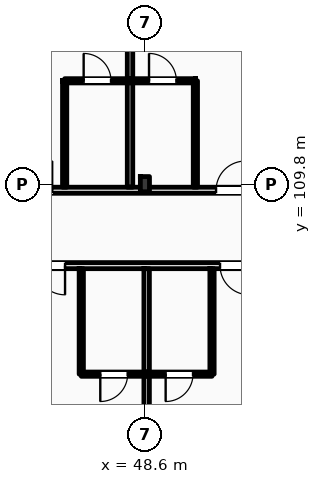
"""IFC4 building model, lengths in metres.
Left out: names, types, materials, properties, quantities, classifications, styles, units other than length and angle.
Written with IfcOpenShell. Run it as: python <this file> out.ifc"""

import sys

from ifc_helpers import new_model, si_unit, direction, frame, frame_2d, origin, origin_2d, place, context, subcontext, project, spatial, rectangle, i_section, extrude, element, fill, save


model = new_model("IFC4")
c1 = context("Model", 3, precision=1e-05, world=origin(), true_north=direction((0.0, 1.0)))
c2 = subcontext(c1, "Body", "Model", "MODEL_VIEW")
j1 = project(units=[si_unit("LENGTHUNIT", "METRE"), si_unit("PLANEANGLEUNIT", "RADIAN")], contexts=[c1])
p1 = place(None, origin())
s1 = spatial("IfcSite", under=j1, at=p1, CompositionType="ELEMENT")
p2 = place(p1, origin())
s2 = spatial("IfcBuilding", under=s1, at=p2, CompositionType="ELEMENT")
p3 = place(p2, frame((0.0, 0.0, 24.6)))
s3 = spatial("IfcBuildingStorey", under=s2, at=p3, CompositionType="ELEMENT", Elevation=24.6)
p4 = place(p3, frame((48.6, 109.8, 0.0), z_axis=(0.0, 0.0, 1.0), x_axis=(1.0, 0.0, 0.0)))
e1 = element("IfcColumn", 1, at=p4, inside=s3, PredefinedType="COLUMN", context=c2, shape_type="SweptSolid", body=[
    extrude(i_section(OverallWidth=0.3, OverallDepth=0.5, WebThickness=0.014, FlangeThickness=0.028, FilletRadius=0.027, at=origin_2d()), origin(), (0.0, 0.0, 1.0), 3.6),
])
p5 = place(p3, frame((10.65, 109.6, 0.0), z_axis=(0.0, 0.0, 1.0), x_axis=(1.0, 0.0, 0.0)))
e2 = element("IfcWall", 2, at=p5, inside=s3, PredefinedType="PARTITIONING", context=c2, shape_type="SweptSolid", body=[
    extrude(rectangle(XDim=109.21, YDim=0.2, at=frame_2d((54.605, 0.0))), origin(), (0.0, 0.0, 1.0), 2.78),
])
p6 = place(p5, frame((12.705, 0.0, 0.0)))
e3 = element("IfcOpeningElement", 3, at=p6, cuts=e2, PredefinedType="OPENING", context=c2, shape_type="SweptSolid", body=[
    extrude(rectangle(XDim=1.02, YDim=2.2, at=frame_2d((0.51, 1.1))), frame((0.0, 0.11, 0.0), z_axis=(0.0, -1.0, 0.0), x_axis=(1.0, 0.0, 0.0)), (0.0, 0.0, 1.0), 0.22),
])
p7 = place(p5, frame((19.26, 0.0, 0.0)))
e4 = element("IfcOpeningElement", 4, at=p7, cuts=e2, PredefinedType="OPENING", context=c2, shape_type="SweptSolid", body=[
    extrude(rectangle(XDim=1.02, YDim=2.2, at=frame_2d((0.51, 1.1))), frame((0.0, 0.11, 0.0), z_axis=(0.0, -1.0, 0.0), x_axis=(1.0, 0.0, 0.0)), (0.0, 0.0, 1.0), 0.22),
])
p8 = place(p5, frame((23.71, 0.0, 0.0)))
e5 = element("IfcOpeningElement", 5, at=p8, cuts=e2, PredefinedType="OPENING", context=c2, shape_type="SweptSolid", body=[
    extrude(rectangle(XDim=1.02, YDim=2.2, at=frame_2d((0.51, 1.1))), frame((0.0, 0.11, 0.0), z_axis=(0.0, -1.0, 0.0), x_axis=(1.0, 0.0, 0.0)), (0.0, 0.0, 1.0), 0.22),
])
p9 = place(p5, frame((27.66, 0.0, 0.0)))
e6 = element("IfcOpeningElement", 6, at=p9, cuts=e2, PredefinedType="OPENING", context=c2, shape_type="SweptSolid", body=[
    extrude(rectangle(XDim=1.02, YDim=2.2, at=frame_2d((0.51, 1.1))), frame((0.0, 0.11, 0.0), z_axis=(0.0, -1.0, 0.0), x_axis=(1.0, 0.0, 0.0)), (0.0, 0.0, 1.0), 0.22),
])
p10 = place(p5, frame((31.89, 0.0, 0.0)))
e7 = element("IfcOpeningElement", 7, at=p10, cuts=e2, PredefinedType="OPENING", context=c2, shape_type="SweptSolid", body=[
    extrude(rectangle(XDim=0.96, YDim=2.2, at=frame_2d((0.48, 1.1))), frame((0.0, 0.11, 0.0), z_axis=(0.0, -1.0, 0.0), x_axis=(1.0, 0.0, 0.0)), (0.0, 0.0, 1.0), 0.22),
])
p11 = place(p5, frame((33.94, 0.0, 0.0)))
e8 = element("IfcOpeningElement", 8, at=p11, cuts=e2, PredefinedType="OPENING", context=c2, shape_type="SweptSolid", body=[
    extrude(rectangle(XDim=0.96, YDim=2.2, at=frame_2d((0.48, 1.1))), frame((0.0, 0.11, 0.0), z_axis=(0.0, -1.0, 0.0), x_axis=(1.0, 0.0, 0.0)), (0.0, 0.0, 1.0), 0.22),
])
p12 = place(p5, frame((40.29, 0.0, 0.0)))
e9 = element("IfcOpeningElement", 9, at=p12, cuts=e2, PredefinedType="OPENING", context=c2, shape_type="SweptSolid", body=[
    extrude(rectangle(XDim=0.96, YDim=2.2, at=frame_2d((0.48, 1.1))), frame((0.0, 0.11, 0.0), z_axis=(0.0, -1.0, 0.0), x_axis=(1.0, 0.0, 0.0)), (0.0, 0.0, 1.0), 0.22),
])
p13 = place(p5, frame((42.34, 0.0, 0.0)))
e10 = element("IfcOpeningElement", 10, at=p13, cuts=e2, PredefinedType="OPENING", context=c2, shape_type="SweptSolid", body=[
    extrude(rectangle(XDim=0.96, YDim=2.2, at=frame_2d((0.48, 1.1))), frame((0.0, 0.11, 0.0), z_axis=(0.0, -1.0, 0.0), x_axis=(1.0, 0.0, 0.0)), (0.0, 0.0, 1.0), 0.22),
])
p14 = place(p5, frame((48.69, 0.0, 0.0)))
e11 = element("IfcOpeningElement", 11, at=p14, cuts=e2, PredefinedType="OPENING", context=c2, shape_type="SweptSolid", body=[
    extrude(rectangle(XDim=0.96, YDim=2.2, at=frame_2d((0.48, 1.1))), frame((0.0, 0.11, 0.0), z_axis=(0.0, -1.0, 0.0), x_axis=(1.0, 0.0, 0.0)), (0.0, 0.0, 1.0), 0.22),
])
p15 = place(p5, frame((50.74, 0.0, 0.0)))
e12 = element("IfcOpeningElement", 12, at=p15, cuts=e2, PredefinedType="OPENING", context=c2, shape_type="SweptSolid", body=[
    extrude(rectangle(XDim=0.96, YDim=2.2, at=frame_2d((0.48, 1.1))), frame((0.0, 0.11, 0.0), z_axis=(0.0, -1.0, 0.0), x_axis=(1.0, 0.0, 0.0)), (0.0, 0.0, 1.0), 0.22),
])
p16 = place(p5, frame((57.09, 0.0, 0.0)))
e13 = element("IfcOpeningElement", 13, at=p16, cuts=e2, PredefinedType="OPENING", context=c2, shape_type="SweptSolid", body=[
    extrude(rectangle(XDim=0.96, YDim=2.2, at=frame_2d((0.48, 1.1))), frame((0.0, 0.11, 0.0), z_axis=(0.0, -1.0, 0.0), x_axis=(1.0, 0.0, 0.0)), (0.0, 0.0, 1.0), 0.22),
])
p17 = place(p5, frame((59.14, 0.0, 0.0)))
e14 = element("IfcOpeningElement", 14, at=p17, cuts=e2, PredefinedType="OPENING", context=c2, shape_type="SweptSolid", body=[
    extrude(rectangle(XDim=0.96, YDim=2.2, at=frame_2d((0.48, 1.1))), frame((0.0, 0.11, 0.0), z_axis=(0.0, -1.0, 0.0), x_axis=(1.0, 0.0, 0.0)), (0.0, 0.0, 1.0), 0.22),
])
p18 = place(p5, frame((65.49, 0.0, 0.0)))
e15 = element("IfcOpeningElement", 15, at=p18, cuts=e2, PredefinedType="OPENING", context=c2, shape_type="SweptSolid", body=[
    extrude(rectangle(XDim=0.96, YDim=2.2, at=frame_2d((0.48, 1.1))), frame((0.0, 0.11, 0.0), z_axis=(0.0, -1.0, 0.0), x_axis=(1.0, 0.0, 0.0)), (0.0, 0.0, 1.0), 0.22),
])
p19 = place(p5, frame((67.54, 0.0, 0.0)))
e16 = element("IfcOpeningElement", 16, at=p19, cuts=e2, PredefinedType="OPENING", context=c2, shape_type="SweptSolid", body=[
    extrude(rectangle(XDim=0.96, YDim=2.2, at=frame_2d((0.48, 1.1))), frame((0.0, 0.11, 0.0), z_axis=(0.0, -1.0, 0.0), x_axis=(1.0, 0.0, 0.0)), (0.0, 0.0, 1.0), 0.22),
])
p20 = place(p5, frame((73.89, 0.0, 0.0)))
e17 = element("IfcOpeningElement", 17, at=p20, cuts=e2, PredefinedType="OPENING", context=c2, shape_type="SweptSolid", body=[
    extrude(rectangle(XDim=0.96, YDim=2.2, at=frame_2d((0.48, 1.1))), frame((0.0, 0.11, 0.0), z_axis=(0.0, -1.0, 0.0), x_axis=(1.0, 0.0, 0.0)), (0.0, 0.0, 1.0), 0.22),
])
p21 = place(p5, frame((78.09, 0.0, 0.0)))
e18 = element("IfcOpeningElement", 18, at=p21, cuts=e2, PredefinedType="OPENING", context=c2, shape_type="SweptSolid", body=[
    extrude(rectangle(XDim=0.96, YDim=2.2, at=frame_2d((0.48, 1.1))), frame((0.0, 0.11, 0.0), z_axis=(0.0, -1.0, 0.0), x_axis=(1.0, 0.0, 0.0)), (0.0, 0.0, 1.0), 0.22),
])
p22 = place(p5, frame((82.29, 0.0, 0.0)))
e19 = element("IfcOpeningElement", 19, at=p22, cuts=e2, PredefinedType="OPENING", context=c2, shape_type="SweptSolid", body=[
    extrude(rectangle(XDim=0.96, YDim=2.2, at=frame_2d((0.48, 1.1))), frame((0.0, 0.11, 0.0), z_axis=(0.0, -1.0, 0.0), x_axis=(1.0, 0.0, 0.0)), (0.0, 0.0, 1.0), 0.22),
])
p23 = place(p5, frame((86.49, 0.0, 0.0)))
e20 = element("IfcOpeningElement", 20, at=p23, cuts=e2, PredefinedType="OPENING", context=c2, shape_type="SweptSolid", body=[
    extrude(rectangle(XDim=0.96, YDim=2.2, at=frame_2d((0.48, 1.1))), frame((0.0, 0.11, 0.0), z_axis=(0.0, -1.0, 0.0), x_axis=(1.0, 0.0, 0.0)), (0.0, 0.0, 1.0), 0.22),
])
p24 = place(p5, frame((88.54, 0.0, 0.0)))
e21 = element("IfcOpeningElement", 21, at=p24, cuts=e2, PredefinedType="OPENING", context=c2, shape_type="SweptSolid", body=[
    extrude(rectangle(XDim=0.96, YDim=2.2, at=frame_2d((0.48, 1.1))), frame((0.0, 0.11, 0.0), z_axis=(0.0, -1.0, 0.0), x_axis=(1.0, 0.0, 0.0)), (0.0, 0.0, 1.0), 0.22),
])
p25 = place(p5, frame((94.89, 0.0, 0.0)))
e22 = element("IfcOpeningElement", 22, at=p25, cuts=e2, PredefinedType="OPENING", context=c2, shape_type="SweptSolid", body=[
    extrude(rectangle(XDim=0.96, YDim=2.2, at=frame_2d((0.48, 1.1))), frame((0.0, 0.11, 0.0), z_axis=(0.0, -1.0, 0.0), x_axis=(1.0, 0.0, 0.0)), (0.0, 0.0, 1.0), 0.22),
])
p26 = place(p5, frame((96.94, 0.0, 0.0)))
e23 = element("IfcOpeningElement", 23, at=p26, cuts=e2, PredefinedType="OPENING", context=c2, shape_type="SweptSolid", body=[
    extrude(rectangle(XDim=0.96, YDim=2.2, at=frame_2d((0.48, 1.1))), frame((0.0, 0.11, 0.0), z_axis=(0.0, -1.0, 0.0), x_axis=(1.0, 0.0, 0.0)), (0.0, 0.0, 1.0), 0.22),
])
p27 = place(p5, frame((103.29, 0.0, 0.0)))
e24 = element("IfcOpeningElement", 24, at=p27, cuts=e2, PredefinedType="OPENING", context=c2, shape_type="SweptSolid", body=[
    extrude(rectangle(XDim=0.96, YDim=2.2, at=frame_2d((0.48, 1.1))), frame((0.0, 0.11, 0.0), z_axis=(0.0, -1.0, 0.0), x_axis=(1.0, 0.0, 0.0)), (0.0, 0.0, 1.0), 0.22),
])
p28 = place(p5, frame((105.25, 0.0, 0.0)))
e25 = element("IfcOpeningElement", 25, at=p28, cuts=e2, PredefinedType="OPENING", context=c2, shape_type="SweptSolid", body=[
    extrude(rectangle(XDim=0.96, YDim=2.2, at=frame_2d((0.48, 1.1))), frame((0.0, 0.11, 0.0), z_axis=(0.0, -1.0, 0.0), x_axis=(1.0, 0.0, 0.0)), (0.0, 0.0, 1.0), 0.22),
])
p29 = place(p5, frame((2.716, 0.0, 0.0)))
e26 = element("IfcOpeningElement", 26, at=p29, cuts=e2, PredefinedType="OPENING", context=c2, shape_type="SweptSolid", body=[
    extrude(rectangle(XDim=1.35, YDim=2.25, at=frame_2d((0.675, 1.125))), frame((0.0, 0.11, 0.0), z_axis=(0.0, -1.0, 0.0), x_axis=(1.0, 0.0, 0.0)), (0.0, 0.0, 1.0), 0.22),
])
p30 = place(p5, frame((6.65, 0.0, 0.0)))
e27 = element("IfcOpeningElement", 27, at=p30, cuts=e2, PredefinedType="OPENING", context=c2, shape_type="SweptSolid", body=[
    extrude(rectangle(XDim=1.35, YDim=2.25, at=frame_2d((0.675, 1.125))), frame((0.0, 0.11, 0.0), z_axis=(0.0, -1.0, 0.0), x_axis=(1.0, 0.0, 0.0)), (0.0, 0.0, 1.0), 0.22),
])
p31 = place(p5, frame((10.583, 0.0, 0.0)))
e28 = element("IfcOpeningElement", 28, at=p31, cuts=e2, PredefinedType="OPENING", context=c2, shape_type="SweptSolid", body=[
    extrude(rectangle(XDim=1.35, YDim=2.25, at=frame_2d((0.675, 1.125))), frame((0.0, 0.11, 0.0), z_axis=(0.0, -1.0, 0.0), x_axis=(1.0, 0.0, 0.0)), (0.0, 0.0, 1.0), 0.22),
])
p32 = place(p3, frame((40.76, 107.12, 0.0), z_axis=(0.0, 0.0, 1.0), x_axis=(1.0, 0.0, 0.0)))
e29 = element("IfcWall", 29, at=p32, inside=s3, PredefinedType="PARTITIONING", context=c2, shape_type="SweptSolid", body=[
    extrude(rectangle(XDim=23.44, YDim=0.2, at=frame_2d((11.72, 0.0))), origin(), (0.0, 0.0, 1.0), 3.34),
])
p33 = place(p32, frame((2.449, 0.0, 0.0)))
e30 = element("IfcOpeningElement", 30, at=p33, cuts=e29, PredefinedType="OPENING", context=c2, shape_type="SweptSolid", body=[
    extrude(rectangle(XDim=0.96, YDim=2.2, at=frame_2d((0.48, 1.1))), frame((0.0, 0.11, 0.0), z_axis=(0.0, -1.0, 0.0), x_axis=(1.0, 0.0, 0.0)), (0.0, 0.0, 1.0), 0.22),
])
p34 = place(p32, frame((4.253, 0.0, 0.0)))
e31 = element("IfcOpeningElement", 31, at=p34, cuts=e29, PredefinedType="OPENING", context=c2, shape_type="SweptSolid", body=[
    extrude(rectangle(XDim=0.96, YDim=2.2, at=frame_2d((0.48, 1.1))), frame((0.0, 0.11, 0.0), z_axis=(0.0, -1.0, 0.0), x_axis=(1.0, 0.0, 0.0)), (0.0, 0.0, 1.0), 0.22),
])
p35 = place(p32, frame((10.311, 0.0, 0.0)))
e32 = element("IfcOpeningElement", 32, at=p35, cuts=e29, PredefinedType="OPENING", context=c2, shape_type="SweptSolid", body=[
    extrude(rectangle(XDim=0.96, YDim=2.2, at=frame_2d((0.48, 1.1))), frame((0.0, 0.11, 0.0), z_axis=(0.0, -1.0, 0.0), x_axis=(1.0, 0.0, 0.0)), (0.0, 0.0, 1.0), 0.22),
])
p36 = place(p32, frame((12.069, 0.0, 0.0)))
e33 = element("IfcOpeningElement", 33, at=p36, cuts=e29, PredefinedType="OPENING", context=c2, shape_type="SweptSolid", body=[
    extrude(rectangle(XDim=0.96, YDim=2.2, at=frame_2d((0.48, 1.1))), frame((0.0, 0.11, 0.0), z_axis=(0.0, -1.0, 0.0), x_axis=(1.0, 0.0, 0.0)), (0.0, 0.0, 1.0), 0.22),
])
p37 = place(p32, frame((18.128, 0.0, 0.0)))
e34 = element("IfcOpeningElement", 34, at=p37, cuts=e29, PredefinedType="OPENING", context=c2, shape_type="SweptSolid", body=[
    extrude(rectangle(XDim=0.96, YDim=2.2, at=frame_2d((0.48, 1.1))), frame((0.0, 0.11, 0.0), z_axis=(0.0, -1.0, 0.0), x_axis=(1.0, 0.0, 0.0)), (0.0, 0.0, 1.0), 0.22),
])
p38 = place(p32, frame((19.841, 0.0, 0.0)))
e35 = element("IfcOpeningElement", 35, at=p38, cuts=e29, PredefinedType="OPENING", context=c2, shape_type="SweptSolid", body=[
    extrude(rectangle(XDim=0.96, YDim=2.2, at=frame_2d((0.48, 1.1))), frame((0.0, 0.11, 0.0), z_axis=(0.0, -1.0, 0.0), x_axis=(1.0, 0.0, 0.0)), (0.0, 0.0, 1.0), 0.22),
])
p39 = place(p3, frame((48.11, 109.7, 0.0), z_axis=(0.0, 0.0, 1.0), x_axis=(0.0, 1.0, 0.0)))
e36 = element("IfcWall", 36, at=p39, inside=s3, PredefinedType="PARTITIONING", context=c2, shape_type="SweptSolid", body=[
    extrude(rectangle(XDim=8.15, YDim=0.18, at=frame_2d((4.075, 0.0))), origin(), (0.0, 0.0, 1.0), 3.34),
])
p40 = place(p3, frame((45.96, 109.7, 0.0), z_axis=(0.0, 0.0, 1.0), x_axis=(0.0, 1.0, 0.0)))
e37 = element("IfcWall", 37, at=p40, inside=s3, PredefinedType="PARTITIONING", context=c2, shape_type="SweptSolid", body=[
    extrude(rectangle(XDim=3.5, YDim=0.14, at=frame_2d((1.75, 0.0))), origin(), (0.0, 0.0, 1.0), 3.03),
])
p41 = place(p3, frame((45.96, 113.2, 0.0), z_axis=(0.0, 0.0, 1.0), x_axis=(1.0, 0.0, 0.0)))
e38 = element("IfcWall", 38, at=p41, inside=s3, PredefinedType="PARTITIONING", context=c2, shape_type="SweptSolid", body=[
    extrude(rectangle(XDim=2.15, YDim=0.14, at=frame_2d((1.075, 0.0))), origin(), (0.0, 0.0, 1.0), 3.34),
])
p42 = place(p41, frame((0.625, 0.0, 0.0)))
e39 = element("IfcOpeningElement", 39, at=p42, cuts=e38, PredefinedType="OPENING", context=c2, shape_type="SweptSolid", body=[
    extrude(rectangle(XDim=0.9, YDim=2.1, at=frame_2d((0.45, 1.05))), frame((0.0, 0.08, 0.0), z_axis=(0.0, -1.0, 0.0), x_axis=(1.0, 0.0, 0.0)), (0.0, 0.0, 1.0), 0.16),
])
p43 = place(p3, frame((50.26, 109.7, 0.0), z_axis=(0.0, 0.0, 1.0), x_axis=(0.0, 1.0, 0.0)))
e40 = element("IfcWall", 40, at=p43, inside=s3, PredefinedType="PARTITIONING", context=c2, shape_type="SweptSolid", body=[
    extrude(rectangle(XDim=3.5, YDim=0.14, at=frame_2d((1.75, 0.0))), origin(), (0.0, 0.0, 1.0), 3.34),
])
p44 = place(p3, frame((48.11, 113.2, 0.0), z_axis=(0.0, 0.0, 1.0), x_axis=(1.0, 0.0, 0.0)))
e41 = element("IfcWall", 41, at=p44, inside=s3, PredefinedType="PARTITIONING", context=c2, shape_type="SweptSolid", body=[
    extrude(rectangle(XDim=2.15, YDim=0.14, at=frame_2d((1.075, 0.0))), origin(), (0.0, 0.0, 1.0), 3.34),
])
p45 = place(p44, frame((0.625, 0.0, 0.0)))
e42 = element("IfcOpeningElement", 42, at=p45, cuts=e41, PredefinedType="OPENING", context=c2, shape_type="SweptSolid", body=[
    extrude(rectangle(XDim=0.9, YDim=2.1, at=frame_2d((0.45, 1.05))), frame((0.0, 0.08, 0.0), z_axis=(0.0, -1.0, 0.0), x_axis=(1.0, 0.0, 0.0)), (0.0, 0.0, 1.0), 0.16),
])
p46 = place(p3, frame((48.657, 96.14, 0.0), z_axis=(0.0, 0.0, 1.0), x_axis=(0.0, 1.0, 0.0)))
e43 = element("IfcWall", 43, at=p46, inside=s3, PredefinedType="PARTITIONING", context=c2, shape_type="SweptSolid", body=[
    extrude(rectangle(XDim=10.88, YDim=0.18, at=frame_2d((5.44, 0.0))), origin(), (0.0, 0.0, 1.0), 2.93),
])
p47 = place(p3, frame((46.507, 103.55, 0.0), z_axis=(0.0, 0.0, 1.0), x_axis=(0.0, 1.0, 0.0)))
e44 = element("IfcWall", 44, at=p47, inside=s3, PredefinedType="PARTITIONING", context=c2, shape_type="SweptSolid", body=[
    extrude(rectangle(XDim=3.47, YDim=0.14, at=frame_2d((1.735, 0.0))), origin(), (0.0, 0.0, 1.0), 3.34),
])
p48 = place(p3, frame((46.507, 103.55, 0.0), z_axis=(0.0, 0.0, 1.0), x_axis=(1.0, 0.0, 0.0)))
e45 = element("IfcWall", 45, at=p48, inside=s3, PredefinedType="PARTITIONING", context=c2, shape_type="SweptSolid", body=[
    extrude(rectangle(XDim=2.15, YDim=0.14, at=frame_2d((1.075, 0.0))), origin(), (0.0, 0.0, 1.0), 3.34),
])
p49 = place(p48, frame((0.625, 0.0, 0.0)))
e46 = element("IfcOpeningElement", 46, at=p49, cuts=e45, PredefinedType="OPENING", context=c2, shape_type="SweptSolid", body=[
    extrude(rectangle(XDim=0.9, YDim=2.1, at=frame_2d((0.45, 1.05))), frame((0.0, 0.08, 0.0), z_axis=(0.0, -1.0, 0.0), x_axis=(1.0, 0.0, 0.0)), (0.0, 0.0, 1.0), 0.16),
])
p50 = place(p3, frame((50.807, 103.55, 0.0), z_axis=(0.0, 0.0, 1.0), x_axis=(0.0, 1.0, 0.0)))
e47 = element("IfcWall", 47, at=p50, inside=s3, PredefinedType="PARTITIONING", context=c2, shape_type="SweptSolid", body=[
    extrude(rectangle(XDim=3.47, YDim=0.14, at=frame_2d((1.735, 0.0))), origin(), (0.0, 0.0, 1.0), 3.34),
])
p51 = place(p3, frame((48.657, 103.55, 0.0), z_axis=(0.0, 0.0, 1.0), x_axis=(1.0, 0.0, 0.0)))
e48 = element("IfcWall", 48, at=p51, inside=s3, PredefinedType="PARTITIONING", context=c2, shape_type="SweptSolid", body=[
    extrude(rectangle(XDim=2.15, YDim=0.14, at=frame_2d((1.075, 0.0))), origin(), (0.0, 0.0, 1.0), 3.34),
])
p52 = place(p51, frame((0.625, 0.0, 0.0)))
e49 = element("IfcOpeningElement", 49, at=p52, cuts=e48, PredefinedType="OPENING", context=c2, shape_type="SweptSolid", body=[
    extrude(rectangle(XDim=0.9, YDim=2.1, at=frame_2d((0.45, 1.05))), frame((0.0, 0.08, 0.0), z_axis=(0.0, -1.0, 0.0), x_axis=(1.0, 0.0, 0.0)), (0.0, 0.0, 1.0), 0.16),
])
p53 = place(p11, origin())
e50 = element("IfcDoor", 50, at=p53, inside=s3, OperationType="SINGLE_SWING_RIGHT", PredefinedType="DOOR", context=c2, shape_type="SweptSolid", body=[
    extrude(rectangle(XDim=0.96, YDim=2.2, at=frame_2d((0.48, 1.1))), frame((0.0, 0.025, 0.0), z_axis=(0.0, -1.0, 0.0), x_axis=(1.0, 0.0, 0.0)), (0.0, 0.0, 1.0), 0.05),
])
fill(e8, e50)
p54 = place(p42, origin())
e51 = element("IfcDoor", 51, at=p54, inside=s3, OperationType="SINGLE_SWING_LEFT", PredefinedType="DOOR", context=c2, shape_type="SweptSolid", body=[
    extrude(rectangle(XDim=0.9, YDim=2.1, at=frame_2d((0.45, 1.05))), frame((0.0, 0.025, 0.0), z_axis=(0.0, -1.0, 0.0), x_axis=(1.0, 0.0, 0.0)), (0.0, 0.0, 1.0), 0.05),
])
fill(e39, e51)
p55 = place(p12, origin())
e52 = element("IfcDoor", 52, at=p55, inside=s3, OperationType="SINGLE_SWING_RIGHT", PredefinedType="DOOR", context=c2, shape_type="SweptSolid", body=[
    extrude(rectangle(XDim=0.96, YDim=2.2, at=frame_2d((0.48, 1.1))), frame((0.0, 0.025, 0.0), z_axis=(0.0, -1.0, 0.0), x_axis=(1.0, 0.0, 0.0)), (0.0, 0.0, 1.0), 0.05),
])
fill(e9, e52)
p56 = place(p45, origin())
e53 = element("IfcDoor", 53, at=p56, inside=s3, OperationType="SINGLE_SWING_LEFT", PredefinedType="DOOR", context=c2, shape_type="SweptSolid", body=[
    extrude(rectangle(XDim=0.9, YDim=2.1, at=frame_2d((0.45, 1.05))), frame((0.0, 0.025, 0.0), z_axis=(0.0, -1.0, 0.0), x_axis=(1.0, 0.0, 0.0)), (0.0, 0.0, 1.0), 0.05),
])
fill(e42, e53)
p57 = place(p34, frame((0.96, 0.0, 0.0), z_axis=(0.0, 0.0, 1.0), x_axis=(-1.0, 0.0, 0.0)))
e54 = element("IfcDoor", 54, at=p57, inside=s3, OperationType="SINGLE_SWING_RIGHT", PredefinedType="DOOR", context=c2, shape_type="SweptSolid", body=[
    extrude(rectangle(XDim=0.96, YDim=2.2, at=frame_2d((0.48, 1.1))), frame((0.0, 0.025, 0.0), z_axis=(0.0, -1.0, 0.0), x_axis=(1.0, 0.0, 0.0)), (0.0, 0.0, 1.0), 0.05),
])
fill(e31, e54)
p58 = place(p49, frame((0.9, 0.0, 0.0), z_axis=(0.0, 0.0, 1.0), x_axis=(-1.0, 0.0, 0.0)))
e55 = element("IfcDoor", 55, at=p58, inside=s3, OperationType="SINGLE_SWING_LEFT", PredefinedType="DOOR", context=c2, shape_type="SweptSolid", body=[
    extrude(rectangle(XDim=0.9, YDim=2.1, at=frame_2d((0.45, 1.05))), frame((0.0, 0.025, 0.0), z_axis=(0.0, -1.0, 0.0), x_axis=(1.0, 0.0, 0.0)), (0.0, 0.0, 1.0), 0.05),
])
fill(e46, e55)
p59 = place(p35, frame((0.96, 0.0, 0.0), z_axis=(0.0, 0.0, 1.0), x_axis=(-1.0, 0.0, 0.0)))
e56 = element("IfcDoor", 56, at=p59, inside=s3, OperationType="SINGLE_SWING_RIGHT", PredefinedType="DOOR", context=c2, shape_type="SweptSolid", body=[
    extrude(rectangle(XDim=0.96, YDim=2.2, at=frame_2d((0.48, 1.1))), frame((0.0, 0.025, 0.0), z_axis=(0.0, -1.0, 0.0), x_axis=(1.0, 0.0, 0.0)), (0.0, 0.0, 1.0), 0.05),
])
fill(e32, e56)
p60 = place(p52, frame((0.9, 0.0, 0.0), z_axis=(0.0, 0.0, 1.0), x_axis=(-1.0, 0.0, 0.0)))
e57 = element("IfcDoor", 57, at=p60, inside=s3, OperationType="SINGLE_SWING_LEFT", PredefinedType="DOOR", context=c2, shape_type="SweptSolid", body=[
    extrude(rectangle(XDim=0.9, YDim=2.1, at=frame_2d((0.45, 1.05))), frame((0.0, 0.025, 0.0), z_axis=(0.0, -1.0, 0.0), x_axis=(1.0, 0.0, 0.0)), (0.0, 0.0, 1.0), 0.05),
])
fill(e49, e57)
save(model, sys.argv[1])
